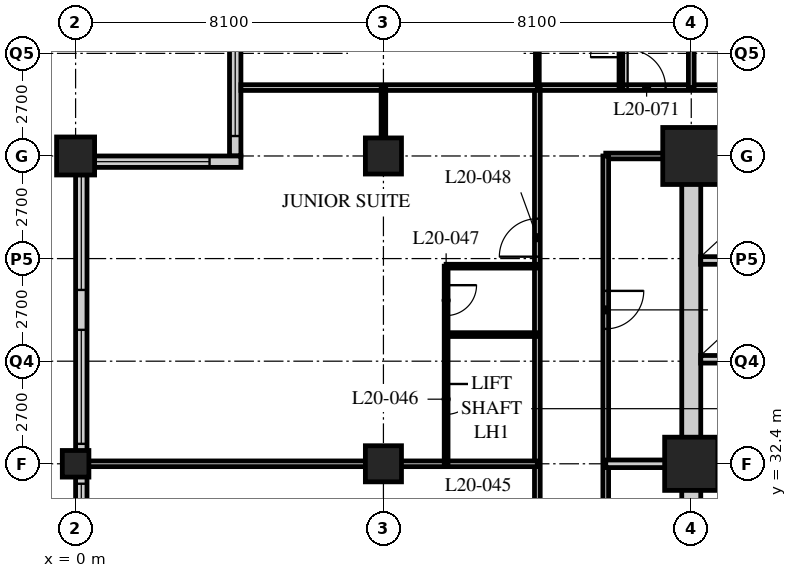
"""IFC4 building model, lengths in metres.
Left out: names, types, materials, properties, quantities, classifications, styles, units other than length and angle.
Written with IfcOpenShell. Run it as: python <this file> out.ifc"""

import sys

from ifc_helpers import new_model, si_unit, direction, frame, frame_2d, origin, origin_2d, place, context, subcontext, project, spatial, rectangle, hollow_rectangle, extrude, element, fill, save


model = new_model("IFC4")
c1 = context("Model", 3, precision=1e-05, world=origin(), true_north=direction((0.0, 1.0)))
c2 = subcontext(c1, "Body", "Model", "MODEL_VIEW")
j1 = project(units=[si_unit("LENGTHUNIT", "METRE"), si_unit("PLANEANGLEUNIT", "RADIAN")], contexts=[c1])
p1 = place(None, origin())
s1 = spatial("IfcSite", under=j1, at=p1, CompositionType="ELEMENT")
p2 = place(p1, origin())
s2 = spatial("IfcBuilding", under=s1, at=p2, CompositionType="ELEMENT")
p3 = place(p2, frame((0.0, 0.0, 80.6)))
s3 = spatial("IfcBuildingStorey", under=s2, at=p3, CompositionType="ELEMENT", Elevation=80.6)
p4 = place(p3, frame((0.0, 32.4, 0.0), z_axis=(0.0, 0.0, 1.0), x_axis=(1.0, 0.0, 0.0)))
e1 = element("IfcColumn", 1, at=p4, inside=s3, PredefinedType="COLUMN", context=c2, shape_type="SweptSolid", body=[
    extrude(hollow_rectangle(XDim=0.7, YDim=0.7, WallThickness=0.06, at=origin_2d()), origin(), (0.0, 0.0, 1.0), 3.4),
])
p5 = place(p3, frame((0.0, 40.5, 0.0), z_axis=(0.0, 0.0, 1.0), x_axis=(1.0, 0.0, 0.0)))
e2 = element("IfcColumn", 2, at=p5, inside=s3, PredefinedType="COLUMN", context=c2, shape_type="SweptSolid", body=[
    extrude(hollow_rectangle(XDim=1.0, YDim=1.0, WallThickness=0.1, at=origin_2d()), origin(), (0.0, 0.0, 1.0), 3.4),
])
for number, where, z_axis, x_axis in (
    (3, (8.1, 32.4, 0.0), (0.0, 0.0, 1.0), (1.0, 0.0, 0.0)),
    (4, (8.1, 40.5, 0.0), (0.0, 0.0, 1.0), (1.0, 0.0, 0.0)),
):
    element("IfcColumn", number, at=place(p3, frame(where, z_axis=z_axis, x_axis=x_axis)), inside=s3, PredefinedType="COLUMN", context=c2, shape_type="SweptSolid", body=[
        extrude(hollow_rectangle(XDim=0.95, YDim=0.95, WallThickness=0.095, at=origin_2d()), origin(), (0.0, 0.0, 1.0), 3.4),
    ])
p6 = place(p3, frame((16.2, 32.4, 0.0), z_axis=(0.0, 0.0, 1.0), x_axis=(1.0, 0.0, 0.0)))
e5 = element("IfcColumn", 5, at=p6, inside=s3, PredefinedType="COLUMN", context=c2, shape_type="SweptSolid", body=[
    extrude(hollow_rectangle(XDim=1.4, YDim=1.4, WallThickness=0.12, at=origin_2d()), origin(), (0.0, 0.0, 1.0), 3.4),
])
p7 = place(p3, frame((16.2, 40.5, 0.0), z_axis=(0.0, 0.0, 1.0), x_axis=(1.0, 0.0, 0.0)))
e6 = element("IfcColumn", 6, at=p7, inside=s3, PredefinedType="COLUMN", context=c2, shape_type="SweptSolid", body=[
    extrude(hollow_rectangle(XDim=1.5, YDim=1.5, WallThickness=0.13, at=origin_2d()), origin(), (0.0, 0.0, 1.0), 3.4),
])
p8 = place(p3, frame((4.2, 44.25, 0.0), z_axis=(0.0, 0.0, 1.0), x_axis=(0.0, -1.0, 0.0)))
e7 = element("IfcWall", 7, at=p8, inside=s3, PredefinedType="SOLIDWALL", context=c2, shape_type="SweptSolid", body=[
    extrude(rectangle(XDim=3.75, YDim=0.3, at=frame_2d((1.875, 0.0))), origin(), (0.0, 0.0, 1.0), 3.19),
])
p9 = place(p8, frame((0.225, 0.0, 0.9)))
e8 = element("IfcOpeningElement", 8, at=p9, cuts=e7, PredefinedType="OPENING", context=c2, shape_type="SweptSolid", body=[
    extrude(rectangle(XDim=3.0, YDim=1.5, at=frame_2d((1.5, 0.75))), frame((0.0, 0.16, 0.0), z_axis=(0.0, -1.0, 0.0), x_axis=(1.0, 0.0, 0.0)), (0.0, 0.0, 1.0), 0.32),
])
p10 = place(p3, frame((4.35, 40.35, 0.0), z_axis=(0.0, 0.0, 1.0), x_axis=(-1.0, 0.0, 0.0)))
e9 = element("IfcWall", 9, at=p10, inside=s3, PredefinedType="SOLIDWALL", context=c2, shape_type="SweptSolid", body=[
    extrude(rectangle(XDim=4.35, YDim=0.3, at=frame_2d((2.175, 0.0))), origin(), (0.0, 0.0, 1.0), 3.19),
])
p11 = place(p10, frame((0.825, 0.0, 0.9)))
e10 = element("IfcOpeningElement", 10, at=p11, cuts=e9, PredefinedType="OPENING", context=c2, shape_type="SweptSolid", body=[
    extrude(rectangle(XDim=3.0, YDim=1.5, at=frame_2d((1.5, 0.75))), frame((0.0, 0.16, 0.0), z_axis=(0.0, -1.0, 0.0), x_axis=(1.0, 0.0, 0.0)), (0.0, 0.0, 1.0), 0.32),
])
p12 = place(p3, frame((0.15, 40.2, 0.0), z_axis=(0.0, 0.0, 1.0), x_axis=(0.0, -1.0, 0.0)))
e11 = element("IfcWall", 11, at=p12, inside=s3, PredefinedType="SOLIDWALL", context=c2, shape_type="SweptSolid", body=[
    extrude(rectangle(XDim=32.1, YDim=0.3, at=frame_2d((16.05, 0.0))), origin(), (0.0, 0.0, 1.0), 3.19),
])
p13 = place(p12, frame((0.225, 0.0, 0.9)))
e12 = element("IfcOpeningElement", 12, at=p13, cuts=e11, PredefinedType="OPENING", context=c2, shape_type="SweptSolid", body=[
    extrude(rectangle(XDim=3.0, YDim=1.5, at=frame_2d((1.5, 0.75))), frame((0.0, 0.16, 0.0), z_axis=(0.0, -1.0, 0.0), x_axis=(1.0, 0.0, 0.0)), (0.0, 0.0, 1.0), 0.32),
])
p14 = place(p12, frame((4.275, 0.0, 0.9)))
e13 = element("IfcOpeningElement", 13, at=p14, cuts=e11, PredefinedType="OPENING", context=c2, shape_type="SweptSolid", body=[
    extrude(rectangle(XDim=3.0, YDim=1.5, at=frame_2d((1.5, 0.75))), frame((0.0, 0.16, 0.0), z_axis=(0.0, -1.0, 0.0), x_axis=(1.0, 0.0, 0.0)), (0.0, 0.0, 1.0), 0.32),
])
p15 = place(p12, frame((8.325, 0.0, 0.9)))
e14 = element("IfcOpeningElement", 14, at=p15, cuts=e11, PredefinedType="OPENING", context=c2, shape_type="SweptSolid", body=[
    extrude(rectangle(XDim=3.0, YDim=1.5, at=frame_2d((1.5, 0.75))), frame((0.0, 0.16, 0.0), z_axis=(0.0, -1.0, 0.0), x_axis=(1.0, 0.0, 0.0)), (0.0, 0.0, 1.0), 0.32),
])
p16 = place(p12, frame((12.375, 0.0, 0.9)))
e15 = element("IfcOpeningElement", 15, at=p16, cuts=e11, PredefinedType="OPENING", context=c2, shape_type="SweptSolid", body=[
    extrude(rectangle(XDim=3.0, YDim=1.5, at=frame_2d((1.5, 0.75))), frame((0.0, 0.16, 0.0), z_axis=(0.0, -1.0, 0.0), x_axis=(1.0, 0.0, 0.0)), (0.0, 0.0, 1.0), 0.32),
])
p17 = place(p12, frame((16.425, 0.0, 0.9)))
e16 = element("IfcOpeningElement", 16, at=p17, cuts=e11, PredefinedType="OPENING", context=c2, shape_type="SweptSolid", body=[
    extrude(rectangle(XDim=3.0, YDim=1.5, at=frame_2d((1.5, 0.75))), frame((0.0, 0.16, 0.0), z_axis=(0.0, -1.0, 0.0), x_axis=(1.0, 0.0, 0.0)), (0.0, 0.0, 1.0), 0.32),
])
p18 = place(p12, frame((20.475, 0.0, 0.9)))
e17 = element("IfcOpeningElement", 17, at=p18, cuts=e11, PredefinedType="OPENING", context=c2, shape_type="SweptSolid", body=[
    extrude(rectangle(XDim=3.0, YDim=1.5, at=frame_2d((1.5, 0.75))), frame((0.0, 0.16, 0.0), z_axis=(0.0, -1.0, 0.0), x_axis=(1.0, 0.0, 0.0)), (0.0, 0.0, 1.0), 0.32),
])
p19 = place(p12, frame((24.525, 0.0, 0.9)))
e18 = element("IfcOpeningElement", 18, at=p19, cuts=e11, PredefinedType="OPENING", context=c2, shape_type="SweptSolid", body=[
    extrude(rectangle(XDim=3.0, YDim=1.5, at=frame_2d((1.5, 0.75))), frame((0.0, 0.16, 0.0), z_axis=(0.0, -1.0, 0.0), x_axis=(1.0, 0.0, 0.0)), (0.0, 0.0, 1.0), 0.32),
])
p20 = place(p12, frame((28.575, 0.0, 0.9)))
e19 = element("IfcOpeningElement", 19, at=p20, cuts=e11, PredefinedType="OPENING", context=c2, shape_type="SweptSolid", body=[
    extrude(rectangle(XDim=3.0, YDim=1.5, at=frame_2d((1.5, 0.75))), frame((0.0, 0.16, 0.0), z_axis=(0.0, -1.0, 0.0), x_axis=(1.0, 0.0, 0.0)), (0.0, 0.0, 1.0), 0.32),
])
p21 = place(p3, frame((12.15, 42.3, 0.0), z_axis=(0.0, 0.0, 1.0), x_axis=(1.0, 0.0, 0.0)))
e20 = element("IfcWall", 20, at=p21, inside=s3, PredefinedType="PARTITIONING", context=c2, shape_type="SweptSolid", body=[
    extrude(rectangle(XDim=36.45, YDim=0.15, at=frame_2d((18.225, 0.0))), origin(), (0.0, 0.0, 1.0), 3.19),
])
p22 = place(p21, frame((9.5, 0.0, 0.0)))
e21 = element("IfcOpeningElement", 21, at=p22, cuts=e20, PredefinedType="OPENING", context=c2, shape_type="SweptSolid", body=[
    extrude(rectangle(XDim=1.0, YDim=2.1, at=frame_2d((0.5, 1.05))), frame((0.0, 0.085, 0.0), z_axis=(0.0, -1.0, 0.0), x_axis=(1.0, 0.0, 0.0)), (0.0, 0.0, 1.0), 0.17),
])
p23 = place(p21, frame((17.6, 0.0, 0.0)))
e22 = element("IfcOpeningElement", 22, at=p23, cuts=e20, PredefinedType="OPENING", context=c2, shape_type="SweptSolid", body=[
    extrude(rectangle(XDim=1.0, YDim=2.1, at=frame_2d((0.5, 1.05))), frame((0.0, 0.085, 0.0), z_axis=(0.0, -1.0, 0.0), x_axis=(1.0, 0.0, 0.0)), (0.0, 0.0, 1.0), 0.17),
])
p24 = place(p21, frame((22.7, 0.0, 0.0)))
e23 = element("IfcOpeningElement", 23, at=p24, cuts=e20, PredefinedType="OPENING", context=c2, shape_type="SweptSolid", body=[
    extrude(rectangle(XDim=1.0, YDim=2.1, at=frame_2d((0.5, 1.05))), frame((0.0, 0.085, 0.0), z_axis=(0.0, -1.0, 0.0), x_axis=(1.0, 0.0, 0.0)), (0.0, 0.0, 1.0), 0.17),
])
p25 = place(p21, frame((26.75, 0.0, 0.0)))
e24 = element("IfcOpeningElement", 24, at=p25, cuts=e20, PredefinedType="OPENING", context=c2, shape_type="SweptSolid", body=[
    extrude(rectangle(XDim=1.0, YDim=2.1, at=frame_2d((0.5, 1.05))), frame((0.0, 0.085, 0.0), z_axis=(0.0, -1.0, 0.0), x_axis=(1.0, 0.0, 0.0)), (0.0, 0.0, 1.0), 0.17),
])
p26 = place(p21, frame((30.8, 0.0, 0.0)))
e25 = element("IfcOpeningElement", 25, at=p26, cuts=e20, PredefinedType="OPENING", context=c2, shape_type="SweptSolid", body=[
    extrude(rectangle(XDim=1.0, YDim=2.1, at=frame_2d((0.5, 1.05))), frame((0.0, 0.085, 0.0), z_axis=(0.0, -1.0, 0.0), x_axis=(1.0, 0.0, 0.0)), (0.0, 0.0, 1.0), 0.17),
])
p27 = place(p21, frame((32.825, 0.0, 0.0)))
e26 = element("IfcOpeningElement", 26, at=p27, cuts=e20, PredefinedType="OPENING", context=c2, shape_type="SweptSolid", body=[
    extrude(rectangle(XDim=1.0, YDim=2.1, at=frame_2d((0.5, 1.05))), frame((0.0, 0.085, 0.0), z_axis=(0.0, -1.0, 0.0), x_axis=(1.0, 0.0, 0.0)), (0.0, 0.0, 1.0), 0.17),
])
p28 = place(p21, frame((2.375, 0.0, 0.0)))
e27 = element("IfcOpeningElement", 27, at=p28, cuts=e20, PredefinedType="OPENING", context=c2, shape_type="SweptSolid", body=[
    extrude(rectangle(XDim=1.0, YDim=2.1, at=frame_2d((0.5, 1.05))), frame((0.0, 0.085, 0.0), z_axis=(0.0, -1.0, 0.0), x_axis=(1.0, 0.0, 0.0)), (0.0, 0.0, 1.0), 0.17),
])
p29 = place(p3, frame((12.15, 16.2, 0.0), z_axis=(0.0, 0.0, 1.0), x_axis=(0.0, 1.0, 0.0)))
e28 = element("IfcWall", 28, at=p29, inside=s3, PredefinedType="PARTITIONING", context=c2, shape_type="SweptSolid", body=[
    extrude(rectangle(XDim=26.1, YDim=0.15, at=frame_2d((13.05, 0.0))), origin(), (0.0, 0.0, 1.0), 3.19),
])
p30 = place(p29, frame((0.3, 0.0, 0.0)))
e29 = element("IfcOpeningElement", 29, at=p30, cuts=e28, PredefinedType="OPENING", context=c2, shape_type="SweptSolid", body=[
    extrude(rectangle(XDim=1.0, YDim=2.1, at=frame_2d((0.5, 1.05))), frame((0.0, 0.085, 0.0), z_axis=(0.0, -1.0, 0.0), x_axis=(1.0, 0.0, 0.0)), (0.0, 0.0, 1.0), 0.17),
])
p31 = place(p29, frame((6.5, 0.0, 0.0)))
e30 = element("IfcOpeningElement", 30, at=p31, cuts=e28, PredefinedType="OPENING", context=c2, shape_type="SweptSolid", body=[
    extrude(rectangle(XDim=1.0, YDim=2.1, at=frame_2d((0.5, 1.05))), frame((0.0, 0.085, 0.0), z_axis=(0.0, -1.0, 0.0), x_axis=(1.0, 0.0, 0.0)), (0.0, 0.0, 1.0), 0.17),
])
p32 = place(p29, frame((13.55, 0.0, 0.0)))
e31 = element("IfcOpeningElement", 31, at=p32, cuts=e28, PredefinedType="OPENING", context=c2, shape_type="SweptSolid", body=[
    extrude(rectangle(XDim=1.0, YDim=2.1, at=frame_2d((0.5, 1.05))), frame((0.0, 0.085, 0.0), z_axis=(0.0, -1.0, 0.0), x_axis=(1.0, 0.0, 0.0)), (0.0, 0.0, 1.0), 0.17),
])
p33 = place(p29, frame((21.65, 0.0, 0.0)))
e32 = element("IfcOpeningElement", 32, at=p33, cuts=e28, PredefinedType="OPENING", context=c2, shape_type="SweptSolid", body=[
    extrude(rectangle(XDim=1.0, YDim=2.1, at=frame_2d((0.5, 1.05))), frame((0.0, 0.085, 0.0), z_axis=(0.0, -1.0, 0.0), x_axis=(1.0, 0.0, 0.0)), (0.0, 0.0, 1.0), 0.17),
])
p34 = place(p3, frame((16.0, 40.5, 0.0), z_axis=(0.0, 0.0, 1.0), x_axis=(-1.0, 0.0, 0.0)))
e33 = element("IfcWall", 33, at=p34, inside=s3, PredefinedType="PARTITIONING", context=c2, shape_type="SweptSolid", body=[
    extrude(rectangle(XDim=2.05, YDim=0.15, at=frame_2d((1.025, 0.0))), origin(), (0.0, 0.0, 1.0), 2.428),
])
p35 = place(p3, frame((13.95, 40.5, 0.0), z_axis=(0.0, 0.0, 1.0), x_axis=(0.0, -1.0, 0.0)))
e34 = element("IfcWall", 34, at=p35, inside=s3, PredefinedType="PARTITIONING", context=c2, shape_type="SweptSolid", body=[
    extrude(rectangle(XDim=22.5, YDim=0.15, at=frame_2d((11.25, 0.0))), origin(), (0.0, 0.0, 1.0), 3.19),
])
p36 = place(p35, frame((11.65, 0.0, 0.0)))
e35 = element("IfcOpeningElement", 35, at=p36, cuts=e34, PredefinedType="OPENING", context=c2, shape_type="SweptSolid", body=[
    extrude(rectangle(XDim=1.0, YDim=2.1, at=frame_2d((0.5, 1.05))), frame((0.0, 0.085, 0.0), z_axis=(0.0, -1.0, 0.0), x_axis=(1.0, 0.0, 0.0)), (0.0, 0.0, 1.0), 0.17),
])
p37 = place(p35, frame((3.55, 0.0, 0.0)))
e36 = element("IfcOpeningElement", 36, at=p37, cuts=e34, PredefinedType="OPENING", context=c2, shape_type="SweptSolid", body=[
    extrude(rectangle(XDim=1.0, YDim=2.1, at=frame_2d((0.5, 1.05))), frame((0.0, 0.085, 0.0), z_axis=(0.0, -1.0, 0.0), x_axis=(1.0, 0.0, 0.0)), (0.0, 0.0, 1.0), 0.17),
])
p38 = place(p3, frame((13.95, 32.4, 0.0), z_axis=(0.0, 0.0, 1.0), x_axis=(1.0, 0.0, 0.0)))
e37 = element("IfcWall", 37, at=p38, inside=s3, PredefinedType="SOLIDWALL", context=c2, shape_type="SweptSolid", body=[
    extrude(rectangle(XDim=2.25, YDim=0.2, at=frame_2d((1.125, 0.0))), origin(), (0.0, 0.0, 1.0), 2.428),
])
p39 = place(p3, frame((12.15, 32.4, 0.0), z_axis=(0.0, 0.0, 1.0), x_axis=(-1.0, 0.0, 0.0)))
e38 = element("IfcWall", 38, at=p39, inside=s3, PredefinedType="PARTITIONING", context=c2, shape_type="SweptSolid", body=[
    extrude(rectangle(XDim=11.85, YDim=0.15, at=frame_2d((5.925, 0.0))), origin(), (0.0, 0.0, 1.0), 2.428),
])
p40 = place(p3, frame((9.75, 32.4, 0.0), z_axis=(0.0, 0.0, 1.0), x_axis=(0.0, 1.0, 0.0)))
e39 = element("IfcWall", 39, at=p40, inside=s3, PredefinedType="PARTITIONING", context=c2, shape_type="SweptSolid", body=[
    extrude(rectangle(XDim=5.2, YDim=0.1, at=frame_2d((2.6, 0.0))), origin(), (0.0, 0.0, 1.0), 3.19),
])
p41 = place(p40, frame((1.3, 0.0, 0.0)))
e40 = element("IfcOpeningElement", 40, at=p41, cuts=e39, PredefinedType="OPENING", context=c2, shape_type="SweptSolid", body=[
    extrude(rectangle(XDim=0.8, YDim=2.1, at=frame_2d((0.4, 1.05))), frame((0.0, 0.06, 0.0), z_axis=(0.0, -1.0, 0.0), x_axis=(1.0, 0.0, 0.0)), (0.0, 0.0, 1.0), 0.12),
])
p42 = place(p40, frame((3.9, 0.0, 0.0)))
e41 = element("IfcOpeningElement", 41, at=p42, cuts=e39, PredefinedType="OPENING", context=c2, shape_type="SweptSolid", body=[
    extrude(rectangle(XDim=0.8, YDim=2.1, at=frame_2d((0.4, 1.05))), frame((0.0, 0.06, 0.0), z_axis=(0.0, -1.0, 0.0), x_axis=(1.0, 0.0, 0.0)), (0.0, 0.0, 1.0), 0.12),
])
for number, where, z_axis, x_axis in (
    (42, (12.15, 35.8, 0.0), (0.0, 0.0, 1.0), (-1.0, 0.0, 0.0)),
    (43, (12.15, 37.6, 0.0), (0.0, 0.0, 1.0), (-1.0, 0.0, 0.0)),
):
    element("IfcWall", number, at=place(p3, frame(where, z_axis=z_axis, x_axis=x_axis)), inside=s3, PredefinedType="PARTITIONING", context=c2, shape_type="SweptSolid", body=[
        extrude(rectangle(XDim=2.4, YDim=0.1, at=frame_2d((1.2, 0.0))), origin(), (0.0, 0.0, 1.0), 3.19),
    ])
p43 = place(p3, frame((14.35, 42.3, 0.0), z_axis=(0.0, 0.0, 1.0), x_axis=(0.0, 1.0, 0.0)))
e44 = element("IfcWall", 44, at=p43, inside=s3, PredefinedType="PARTITIONING", context=c2, shape_type="SweptSolid", body=[
    extrude(rectangle(XDim=2.4, YDim=0.1, at=frame_2d((1.2, 0.0))), origin(), (0.0, 0.0, 1.0), 3.19),
])
p44 = place(p43, frame((0.8, 0.0, 0.0)))
e45 = element("IfcOpeningElement", 45, at=p44, cuts=e44, PredefinedType="OPENING", context=c2, shape_type="SweptSolid", body=[
    extrude(rectangle(XDim=0.8, YDim=2.1, at=frame_2d((0.4, 1.05))), frame((0.0, 0.06, 0.0), z_axis=(0.0, -1.0, 0.0), x_axis=(1.0, 0.0, 0.0)), (0.0, 0.0, 1.0), 0.12),
])
p45 = place(p3, frame((12.15, 42.3, 0.0), z_axis=(0.0, 0.0, 1.0), x_axis=(0.0, 1.0, 0.0)))
e46 = element("IfcWall", 46, at=p45, inside=s3, PredefinedType="PARTITIONING", context=c2, shape_type="SweptSolid", body=[
    extrude(rectangle(XDim=2.4, YDim=0.1, at=frame_2d((1.2, 0.0))), origin(), (0.0, 0.0, 1.0), 3.19),
])
p46 = place(p3, frame((4.35, 42.3, 0.0), z_axis=(0.0, 0.0, 1.0), x_axis=(1.0, 0.0, 0.0)))
e47 = element("IfcWall", 47, at=p46, inside=s3, PredefinedType="PARTITIONING", context=c2, shape_type="SweptSolid", body=[
    extrude(rectangle(XDim=7.8, YDim=0.15, at=frame_2d((3.9, 0.0))), origin(), (0.0, 0.0, 1.0), 3.19),
])
p47 = place(p3, frame((16.2, 42.3, 0.0), z_axis=(0.0, 0.0, 1.0), x_axis=(0.0, 1.0, 0.0)))
e48 = element("IfcWall", 48, at=p47, inside=s3, PredefinedType="PARTITIONING", context=c2, shape_type="SweptSolid", body=[
    extrude(rectangle(XDim=6.0, YDim=0.15, at=frame_2d((3.0, 0.0))), origin(), (0.0, 0.0, 1.0), 2.428),
])
p48 = place(p3, frame((8.1, 42.3, 0.0), z_axis=(0.0, 0.0, 1.0), x_axis=(0.0, -1.0, 0.0)))
e49 = element("IfcWall", 49, at=p48, inside=s3, PredefinedType="PARTITIONING", context=c2, shape_type="SweptSolid", body=[
    extrude(rectangle(XDim=1.325, YDim=0.12, at=frame_2d((0.663, 0.0))), origin(), (0.0, 0.0, 1.0), 2.428),
])
p49 = place(p3, frame((15.95, 40.5, 0.0), z_axis=(0.0, 0.0, 1.0), x_axis=(1.0, 0.0, 0.0)))
e50 = element("IfcWall", 50, at=p49, inside=s3, PredefinedType="SOLIDWALL", context=c2, shape_type="SweptSolid", body=[
    extrude(rectangle(XDim=24.8, YDim=0.5, at=frame_2d((12.4, 0.0))), origin(), (0.0, 0.0, 1.0), 2.428),
])
p50 = place(p49, frame((11.5, 0.0, 0.0)))
e51 = element("IfcOpeningElement", 51, at=p50, cuts=e50, PredefinedType="OPENING", context=c2, shape_type="SweptSolid", body=[
    extrude(rectangle(XDim=1.8, YDim=2.4, at=frame_2d((0.9, 1.2))), frame((0.0, 0.26, 0.0), z_axis=(0.0, -1.0, 0.0), x_axis=(1.0, 0.0, 0.0)), (0.0, 0.0, 1.0), 0.52),
])
p51 = place(p3, frame((16.2, 24.55, 0.0), z_axis=(0.0, 0.0, 1.0), x_axis=(0.0, 1.0, 0.0)))
e52 = element("IfcWall", 52, at=p51, inside=s3, PredefinedType="SOLIDWALL", context=c2, shape_type="SweptSolid", body=[
    extrude(rectangle(XDim=15.7, YDim=0.5, at=frame_2d((7.85, 0.0))), origin(), (0.0, 0.0, 1.0), 2.428),
])
p52 = place(p3, frame((16.45, 32.4, 0.0), z_axis=(0.0, 0.0, 1.0), x_axis=(1.0, 0.0, 0.0)))
e53 = element("IfcWall", 53, at=p52, inside=s3, PredefinedType="SOLIDWALL", context=c2, shape_type="SweptSolid", body=[
    extrude(rectangle(XDim=7.95, YDim=0.2, at=frame_2d((3.975, 0.0))), origin(), (0.0, 0.0, 1.0), 2.578),
])
for number, where, z_axis, x_axis in (
    (54, (16.45, 35.15, 0.0), (0.0, 0.0, 1.0), (1.0, 0.0, 0.0)),
    (55, (16.45, 37.75, 0.0), (0.0, 0.0, 1.0), (1.0, 0.0, 0.0)),
):
    element("IfcWall", number, at=place(p3, frame(where, z_axis=z_axis, x_axis=x_axis)), inside=s3, PredefinedType="SOLIDWALL", context=c2, shape_type="SweptSolid", body=[
        extrude(rectangle(XDim=2.6, YDim=0.2, at=frame_2d((1.3, 0.0))), origin(), (0.0, 0.0, 1.0), 3.19),
    ])
p53 = place(p9, origin())
e56 = element("IfcWindow", 56, at=p53, inside=s3, PartitioningType="SINGLE_PANEL", PredefinedType="WINDOW", context=c2, shape_type="SweptSolid", body=[
    extrude(rectangle(XDim=3.0, YDim=1.5, at=frame_2d((1.5, 0.75))), frame((0.0, 0.03, 0.0), z_axis=(0.0, -1.0, 0.0), x_axis=(1.0, 0.0, 0.0)), (0.0, 0.0, 1.0), 0.06),
])
fill(e8, e56)
p54 = place(p11, origin())
e57 = element("IfcWindow", 57, at=p54, inside=s3, PartitioningType="SINGLE_PANEL", PredefinedType="WINDOW", context=c2, shape_type="SweptSolid", body=[
    extrude(rectangle(XDim=3.0, YDim=1.5, at=frame_2d((1.5, 0.75))), frame((0.0, 0.03, 0.0), z_axis=(0.0, -1.0, 0.0), x_axis=(1.0, 0.0, 0.0)), (0.0, 0.0, 1.0), 0.06),
])
fill(e10, e57)
p55 = place(p13, origin())
e58 = element("IfcWindow", 58, at=p55, inside=s3, PartitioningType="SINGLE_PANEL", PredefinedType="WINDOW", context=c2, shape_type="SweptSolid", body=[
    extrude(rectangle(XDim=3.0, YDim=1.5, at=frame_2d((1.5, 0.75))), frame((0.0, 0.03, 0.0), z_axis=(0.0, -1.0, 0.0), x_axis=(1.0, 0.0, 0.0)), (0.0, 0.0, 1.0), 0.06),
])
fill(e12, e58)
p56 = place(p14, origin())
e59 = element("IfcWindow", 59, at=p56, inside=s3, PartitioningType="SINGLE_PANEL", PredefinedType="WINDOW", context=c2, shape_type="SweptSolid", body=[
    extrude(rectangle(XDim=3.0, YDim=1.5, at=frame_2d((1.5, 0.75))), frame((0.0, 0.03, 0.0), z_axis=(0.0, -1.0, 0.0), x_axis=(1.0, 0.0, 0.0)), (0.0, 0.0, 1.0), 0.06),
])
fill(e13, e59)
p57 = place(p15, origin())
e60 = element("IfcWindow", 60, at=p57, inside=s3, PartitioningType="SINGLE_PANEL", PredefinedType="WINDOW", context=c2, shape_type="SweptSolid", body=[
    extrude(rectangle(XDim=3.0, YDim=1.5, at=frame_2d((1.5, 0.75))), frame((0.0, 0.03, 0.0), z_axis=(0.0, -1.0, 0.0), x_axis=(1.0, 0.0, 0.0)), (0.0, 0.0, 1.0), 0.06),
])
fill(e14, e60)
p58 = place(p37, origin())
e61 = element("IfcDoor", 61, at=p58, inside=s3, OperationType="SINGLE_SWING_LEFT", PredefinedType="DOOR", context=c2, shape_type="SweptSolid", body=[
    extrude(rectangle(XDim=1.0, YDim=2.1, at=frame_2d((0.5, 1.05))), frame((0.0, 0.025, 0.0), z_axis=(0.0, -1.0, 0.0), x_axis=(1.0, 0.0, 0.0)), (0.0, 0.0, 1.0), 0.05),
])
fill(e36, e61)
p59 = place(p41, origin())
e62 = element("IfcDoor", 62, at=p59, inside=s3, OperationType="SINGLE_SWING_LEFT", PredefinedType="DOOR", context=c2, shape_type="SweptSolid", body=[
    extrude(rectangle(XDim=0.8, YDim=2.1, at=frame_2d((0.4, 1.05))), frame((0.0, 0.025, 0.0), z_axis=(0.0, -1.0, 0.0), x_axis=(1.0, 0.0, 0.0)), (0.0, 0.0, 1.0), 0.05),
])
fill(e40, e62)
p60 = place(p42, origin())
e63 = element("IfcDoor", 63, at=p60, inside=s3, OperationType="SINGLE_SWING_LEFT", PredefinedType="DOOR", context=c2, shape_type="SweptSolid", body=[
    extrude(rectangle(XDim=0.8, YDim=2.1, at=frame_2d((0.4, 1.05))), frame((0.0, 0.025, 0.0), z_axis=(0.0, -1.0, 0.0), x_axis=(1.0, 0.0, 0.0)), (0.0, 0.0, 1.0), 0.05),
])
fill(e41, e63)
p61 = place(p33, origin())
e64 = element("IfcDoor", 64, at=p61, inside=s3, OperationType="SINGLE_SWING_LEFT", PredefinedType="DOOR", context=c2, shape_type="SweptSolid", body=[
    extrude(rectangle(XDim=1.0, YDim=2.1, at=frame_2d((0.5, 1.05))), frame((0.0, 0.025, 0.0), z_axis=(0.0, -1.0, 0.0), x_axis=(1.0, 0.0, 0.0)), (0.0, 0.0, 1.0), 0.05),
])
fill(e32, e64)
p62 = place(p44, origin())
e65 = element("IfcDoor", 65, at=p62, inside=s3, OperationType="SINGLE_SWING_LEFT", PredefinedType="DOOR", context=c2, shape_type="SweptSolid", body=[
    extrude(rectangle(XDim=0.8, YDim=2.1, at=frame_2d((0.4, 1.05))), frame((0.0, 0.025, 0.0), z_axis=(0.0, -1.0, 0.0), x_axis=(1.0, 0.0, 0.0)), (0.0, 0.0, 1.0), 0.05),
])
fill(e45, e65)
p63 = place(p28, origin())
e66 = element("IfcDoor", 66, at=p63, inside=s3, OperationType="SINGLE_SWING_LEFT", PredefinedType="DOOR", context=c2, shape_type="SweptSolid", body=[
    extrude(rectangle(XDim=1.0, YDim=2.1, at=frame_2d((0.5, 1.05))), frame((0.0, 0.025, 0.0), z_axis=(0.0, -1.0, 0.0), x_axis=(1.0, 0.0, 0.0)), (0.0, 0.0, 1.0), 0.05),
])
fill(e27, e66)
save(model, sys.argv[1])
